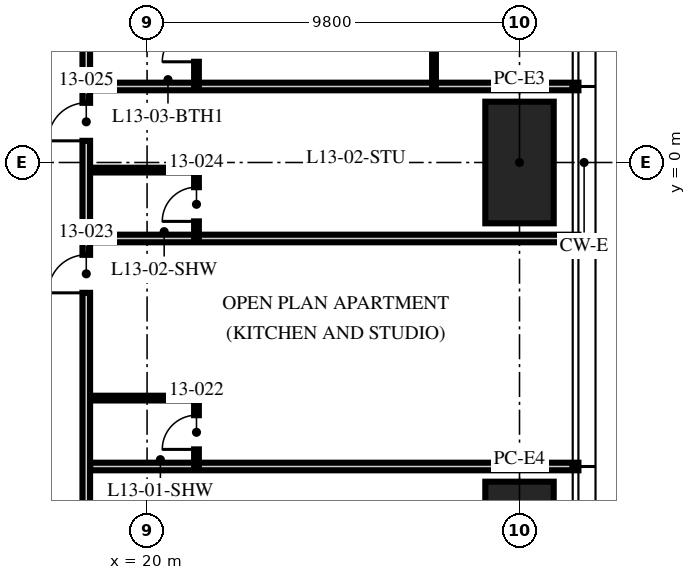
"""IFC4 building model, lengths in metres.
Left out: names, types, materials, properties, quantities, classifications, styles, units other than length and angle.
Written with IfcOpenShell. Run it as: python <this file> out.ifc"""

import sys

from ifc_helpers import new_model, si_unit, direction, frame, frame_2d, origin, origin_2d, place, context, subcontext, project, spatial, rectangle, hollow_rectangle, extrude, element, fill, save


model = new_model("IFC4")
c1 = context("Model", 3, precision=1e-05, world=origin(), true_north=direction((0.0, 1.0)))
c2 = subcontext(c1, "Body", "Model", "MODEL_VIEW")
j1 = project(units=[si_unit("LENGTHUNIT", "METRE"), si_unit("PLANEANGLEUNIT", "RADIAN")], contexts=[c1])
p1 = place(None, origin())
s1 = spatial("IfcSite", under=j1, at=p1, CompositionType="ELEMENT")
p2 = place(p1, origin())
s2 = spatial("IfcBuilding", under=s1, at=p2, CompositionType="ELEMENT")
p3 = place(p2, frame((0.0, 0.0, 54.75)))
s3 = spatial("IfcBuildingStorey", under=s2, at=p3, CompositionType="ELEMENT", Elevation=54.75)
for number, where, z_axis, x_axis in (
    (1, (29.8, 0.0, 0.0), (0.0, 0.0, 1.0), (0.0, 1.0, 0.0)),
    (2, (29.8, -10.0, 0.0), (0.0, 0.0, 1.0), (0.0, 1.0, 0.0)),
):
    element("IfcColumn", number, at=place(p3, frame(where, z_axis=z_axis, x_axis=x_axis)), inside=s3, PredefinedType="COLUMN", context=c2, shape_type="SweptSolid", body=[
        extrude(hollow_rectangle(XDim=3.2, YDim=1.8, WallThickness=0.2, at=origin_2d()), origin(), (0.0, 0.0, 1.0), 3.75),
    ])
for number, where, z_axis, x_axis in (
    (3, (18.5, -8.0, 0.0), (0.0, 0.0, 1.0), (1.0, 0.0, 0.0)),
    (4, (18.5, -2.0, 0.0), (0.0, 0.0, 1.0), (1.0, 0.0, 0.0)),
    (5, (18.5, 2.0, 0.0), (0.0, 0.0, 1.0), (1.0, 0.0, 0.0)),
):
    element("IfcWall", number, at=place(p3, frame(where, z_axis=z_axis, x_axis=x_axis)), inside=s3, PredefinedType="PARTITIONING", context=c2, shape_type="SweptSolid", body=[
        extrude(rectangle(XDim=12.85, YDim=0.2, at=frame_2d((6.425, 0.0))), origin(), (0.0, 0.0, 1.0), 2.71),
    ])
p4 = place(p3, frame((21.3, -8.0, 0.0), z_axis=(0.0, 0.0, 1.0), x_axis=(0.0, 1.0, 0.0)))
e6 = element("IfcWall", 6, at=p4, inside=s3, PredefinedType="PARTITIONING", context=c2, shape_type="SweptSolid", body=[
    extrude(rectangle(XDim=1.8, YDim=0.125, at=frame_2d((0.9, 0.0))), origin(), (0.0, 0.0, 1.0), 3.5),
])
p5 = place(p4, frame((0.45, 0.0, 0.0)))
e7 = element("IfcOpeningElement", 7, at=p5, cuts=e6, PredefinedType="OPENING", context=c2, shape_type="SweptSolid", body=[
    extrude(rectangle(XDim=0.9, YDim=2.1, at=frame_2d((0.45, 1.05))), frame((0.0, 0.073, 0.0), z_axis=(0.0, -1.0, 0.0), x_axis=(1.0, 0.0, 0.0)), (0.0, 0.0, 1.0), 0.145),
])
p6 = place(p3, frame((18.5, -6.2, 0.0), z_axis=(0.0, 0.0, 1.0), x_axis=(1.0, 0.0, 0.0)))
e8 = element("IfcWall", 8, at=p6, inside=s3, PredefinedType="PARTITIONING", context=c2, shape_type="SweptSolid", body=[
    extrude(rectangle(XDim=2.8, YDim=0.125, at=frame_2d((1.4, 0.0))), origin(), (0.0, 0.0, 1.0), 3.5),
])
p7 = place(p3, frame((21.3, -2.0, 0.0), z_axis=(0.0, 0.0, 1.0), x_axis=(0.0, 1.0, 0.0)))
e9 = element("IfcWall", 9, at=p7, inside=s3, PredefinedType="PARTITIONING", context=c2, shape_type="SweptSolid", body=[
    extrude(rectangle(XDim=1.8, YDim=0.125, at=frame_2d((0.9, 0.0))), origin(), (0.0, 0.0, 1.0), 3.5),
])
p8 = place(p7, frame((0.45, 0.0, 0.0)))
e10 = element("IfcOpeningElement", 10, at=p8, cuts=e9, PredefinedType="OPENING", context=c2, shape_type="SweptSolid", body=[
    extrude(rectangle(XDim=0.9, YDim=2.1, at=frame_2d((0.45, 1.05))), frame((0.0, 0.073, 0.0), z_axis=(0.0, -1.0, 0.0), x_axis=(1.0, 0.0, 0.0)), (0.0, 0.0, 1.0), 0.145),
])
p9 = place(p3, frame((18.5, -0.2, 0.0), z_axis=(0.0, 0.0, 1.0), x_axis=(1.0, 0.0, 0.0)))
e11 = element("IfcWall", 11, at=p9, inside=s3, PredefinedType="PARTITIONING", context=c2, shape_type="SweptSolid", body=[
    extrude(rectangle(XDim=2.8, YDim=0.125, at=frame_2d((1.4, 0.0))), origin(), (0.0, 0.0, 1.0), 2.492),
])
p10 = place(p3, frame((27.55, 2.0, 0.0), z_axis=(0.0, 0.0, 1.0), x_axis=(0.0, 1.0, 0.0)))
e12 = element("IfcWall", 12, at=p10, inside=s3, PredefinedType="PARTITIONING", context=c2, shape_type="SweptSolid", body=[
    extrude(rectangle(XDim=6.0, YDim=0.1, at=frame_2d((3.0, 0.0))), origin(), (0.0, 0.0, 1.0), 2.61),
])
p11 = place(p10, frame((2.55, 0.0, 0.0)))
e13 = element("IfcOpeningElement", 13, at=p11, cuts=e12, PredefinedType="OPENING", context=c2, shape_type="SweptSolid", body=[
    extrude(rectangle(XDim=0.9, YDim=2.1, at=frame_2d((0.45, 1.05))), frame((0.0, 0.06, 0.0), z_axis=(0.0, -1.0, 0.0), x_axis=(1.0, 0.0, 0.0)), (0.0, 0.0, 1.0), 0.12),
])
p12 = place(p3, frame((21.3, 2.0, 0.0), z_axis=(0.0, 0.0, 1.0), x_axis=(0.0, 1.0, 0.0)))
e14 = element("IfcWall", 14, at=p12, inside=s3, PredefinedType="PARTITIONING", context=c2, shape_type="SweptSolid", body=[
    extrude(rectangle(XDim=4.4, YDim=0.125, at=frame_2d((2.2, 0.0))), origin(), (0.0, 0.0, 1.0), 2.61),
])
p13 = place(p12, frame((0.65, 0.0, 0.0)))
e15 = element("IfcOpeningElement", 15, at=p13, cuts=e14, PredefinedType="OPENING", context=c2, shape_type="SweptSolid", body=[
    extrude(rectangle(XDim=0.9, YDim=2.1, at=frame_2d((0.45, 1.05))), frame((0.0, 0.073, 0.0), z_axis=(0.0, -1.0, 0.0), x_axis=(1.0, 0.0, 0.0)), (0.0, 0.0, 1.0), 0.145),
])
p14 = place(p12, frame((2.85, 0.0, 0.0)))
e16 = element("IfcOpeningElement", 16, at=p14, cuts=e14, PredefinedType="OPENING", context=c2, shape_type="SweptSolid", body=[
    extrude(rectangle(XDim=0.9, YDim=2.1, at=frame_2d((0.45, 1.05))), frame((0.0, 0.073, 0.0), z_axis=(0.0, -1.0, 0.0), x_axis=(1.0, 0.0, 0.0)), (0.0, 0.0, 1.0), 0.145),
])
p15 = place(p3, frame((18.4, -18.3, 0.0), z_axis=(0.0, 0.0, 1.0), x_axis=(0.0, 1.0, 0.0)))
e17 = element("IfcWall", 17, at=p15, inside=s3, PredefinedType="PARTITIONING", context=c2, shape_type="SweptSolid", body=[
    extrude(rectangle(XDim=36.6, YDim=0.2, at=frame_2d((18.3, 0.0))), origin(), (0.0, 0.0, 1.0), 2.3),
])
p16 = place(p15, frame((14.87, 0.0, 0.0)))
e18 = element("IfcOpeningElement", 18, at=p16, cuts=e17, PredefinedType="OPENING", context=c2, shape_type="SweptSolid", body=[
    extrude(rectangle(XDim=1.0, YDim=2.2, at=frame_2d((0.5, 1.1))), frame((0.0, 0.11, 0.0), z_axis=(0.0, -1.0, 0.0), x_axis=(1.0, 0.0, 0.0)), (0.0, 0.0, 1.0), 0.22),
])
p17 = place(p15, frame((18.87, 0.0, 0.0)))
e19 = element("IfcOpeningElement", 19, at=p17, cuts=e17, PredefinedType="OPENING", context=c2, shape_type="SweptSolid", body=[
    extrude(rectangle(XDim=1.0, YDim=2.2, at=frame_2d((0.5, 1.1))), frame((0.0, 0.11, 0.0), z_axis=(0.0, -1.0, 0.0), x_axis=(1.0, 0.0, 0.0)), (0.0, 0.0, 1.0), 0.22),
])
p18 = place(p15, frame((34.82, 0.0, 0.0)))
e20 = element("IfcOpeningElement", 20, at=p18, cuts=e17, PredefinedType="OPENING", context=c2, shape_type="SweptSolid", body=[
    extrude(rectangle(XDim=1.0, YDim=2.2, at=frame_2d((0.5, 1.1))), frame((0.0, 0.11, 0.0), z_axis=(0.0, -1.0, 0.0), x_axis=(1.0, 0.0, 0.0)), (0.0, 0.0, 1.0), 0.22),
])
p19 = place(p5, origin())
e21 = element("IfcDoor", 21, at=p19, inside=s3, OperationType="SINGLE_SWING_LEFT", PredefinedType="DOOR", context=c2, shape_type="SweptSolid", body=[
    extrude(rectangle(XDim=0.9, YDim=2.1, at=frame_2d((0.45, 1.05))), frame((0.0, 0.025, 0.0), z_axis=(0.0, -1.0, 0.0), x_axis=(1.0, 0.0, 0.0)), (0.0, 0.0, 1.0), 0.05),
])
fill(e7, e21)
p20 = place(p16, origin())
e22 = element("IfcDoor", 22, at=p20, inside=s3, OperationType="SINGLE_SWING_LEFT", PredefinedType="DOOR", context=c2, shape_type="SweptSolid", body=[
    extrude(rectangle(XDim=1.0, YDim=2.2, at=frame_2d((0.5, 1.1))), frame((0.0, 0.025, 0.0), z_axis=(0.0, -1.0, 0.0), x_axis=(1.0, 0.0, 0.0)), (0.0, 0.0, 1.0), 0.05),
])
fill(e18, e22)
p21 = place(p8, origin())
e23 = element("IfcDoor", 23, at=p21, inside=s3, OperationType="SINGLE_SWING_LEFT", PredefinedType="DOOR", context=c2, shape_type="SweptSolid", body=[
    extrude(rectangle(XDim=0.9, YDim=2.1, at=frame_2d((0.45, 1.05))), frame((0.0, 0.025, 0.0), z_axis=(0.0, -1.0, 0.0), x_axis=(1.0, 0.0, 0.0)), (0.0, 0.0, 1.0), 0.05),
])
fill(e10, e23)
p22 = place(p17, origin())
e24 = element("IfcDoor", 24, at=p22, inside=s3, OperationType="SINGLE_SWING_LEFT", PredefinedType="DOOR", context=c2, shape_type="SweptSolid", body=[
    extrude(rectangle(XDim=1.0, YDim=2.2, at=frame_2d((0.5, 1.1))), frame((0.0, 0.025, 0.0), z_axis=(0.0, -1.0, 0.0), x_axis=(1.0, 0.0, 0.0)), (0.0, 0.0, 1.0), 0.05),
])
fill(e19, e24)
p23 = place(p13, origin())
e25 = element("IfcDoor", 25, at=p23, inside=s3, OperationType="SINGLE_SWING_LEFT", PredefinedType="DOOR", context=c2, shape_type="SweptSolid", body=[
    extrude(rectangle(XDim=0.9, YDim=2.1, at=frame_2d((0.45, 1.05))), frame((0.0, 0.025, 0.0), z_axis=(0.0, -1.0, 0.0), x_axis=(1.0, 0.0, 0.0)), (0.0, 0.0, 1.0), 0.05),
])
fill(e15, e25)
save(model, sys.argv[1])
